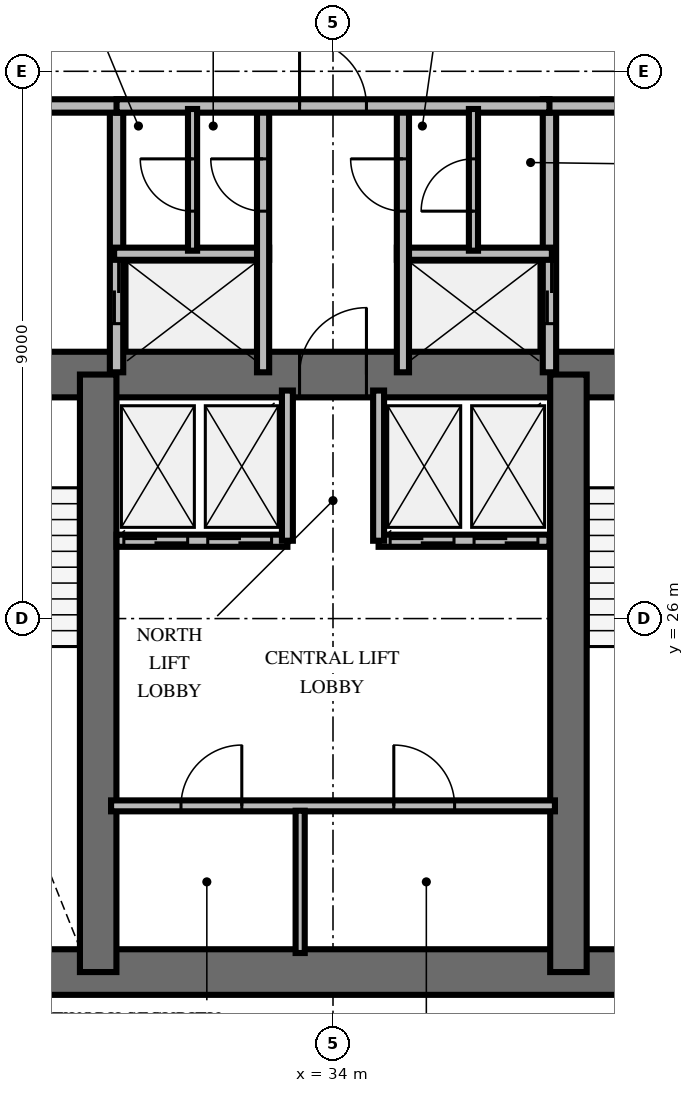
"""IFC4 building model, lengths in metres.
Left out: names, types, materials, properties, quantities, classifications, styles, units other than length and angle.
Written with IfcOpenShell. Run it as: python <this file> out.ifc"""

import sys

from ifc_helpers import new_model, si_unit, direction, frame, frame_2d, origin, place, context, subcontext, project, spatial, rectangle, extrude, element, fill, save


model = new_model("IFC4")
c1 = context("Model", 3, precision=1e-05, world=origin(), true_north=direction((0.0, 1.0)))
c2 = subcontext(c1, "Body", "Model", "MODEL_VIEW")
j1 = project(units=[si_unit("LENGTHUNIT", "METRE"), si_unit("PLANEANGLEUNIT", "RADIAN")], contexts=[c1])
p1 = place(None, origin())
s1 = spatial("IfcSite", under=j1, at=p1, CompositionType="ELEMENT")
p2 = place(p1, origin())
s2 = spatial("IfcBuilding", under=s1, at=p2, CompositionType="ELEMENT")
p3 = place(p2, frame((0.0, 0.0, 202.4)))
s3 = spatial("IfcBuildingStorey", under=s2, at=p3, CompositionType="ELEMENT", Elevation=202.4)
p4 = place(p3, frame((26.072, 20.187, 0.0), z_axis=(0.0, 0.0, 1.0), x_axis=(1.0, 0.0, 0.0)))
e1 = element("IfcWall", 1, at=p4, inside=s3, PredefinedType="SHEAR", context=c2, shape_type="SweptSolid", body=[
    extrude(rectangle(XDim=15.866, YDim=0.75, at=frame_2d((7.933, 0.0))), origin(), (0.0, 0.0, 1.0), 3.6),
])
p5 = place(p3, frame((26.072, 30.013, 0.0), z_axis=(0.0, 0.0, 1.0), x_axis=(1.0, 0.0, 0.0)))
e2 = element("IfcWall", 2, at=p5, inside=s3, PredefinedType="SHEAR", context=c2, shape_type="SweptSolid", body=[
    extrude(rectangle(XDim=15.866, YDim=0.75, at=frame_2d((7.933, 0.0))), origin(), (0.0, 0.0, 1.0), 3.6),
])
p6 = place(p5, frame((0.878, 0.0, 0.0)))
e3 = element("IfcOpeningElement", 3, at=p6, cuts=e2, PredefinedType="OPENING", context=c2, shape_type="SweptSolid", body=[
    extrude(rectangle(XDim=1.05, YDim=2.15, at=frame_2d((0.525, 1.075))), frame((0.0, 0.385, 0.0), z_axis=(0.0, -1.0, 0.0), x_axis=(1.0, 0.0, 0.0)), (0.0, 0.0, 1.0), 0.77),
])
p7 = place(p5, frame((13.928, 0.0, 0.0)))
e4 = element("IfcOpeningElement", 4, at=p7, cuts=e2, PredefinedType="OPENING", context=c2, shape_type="SweptSolid", body=[
    extrude(rectangle(XDim=1.05, YDim=2.15, at=frame_2d((0.525, 1.075))), frame((0.0, 0.385, 0.0), z_axis=(0.0, -1.0, 0.0), x_axis=(1.0, 0.0, 0.0)), (0.0, 0.0, 1.0), 0.77),
])
p8 = place(p5, frame((7.378, 0.0, 0.0)))
e5 = element("IfcOpeningElement", 5, at=p8, cuts=e2, PredefinedType="OPENING", context=c2, shape_type="SweptSolid", body=[
    extrude(rectangle(XDim=1.1, YDim=2.15, at=frame_2d((0.55, 1.075))), frame((0.0, 0.385, 0.0), z_axis=(0.0, -1.0, 0.0), x_axis=(1.0, 0.0, 0.0)), (0.0, 0.0, 1.0), 0.77),
])
for number, where, z_axis, x_axis in (
    (6, (30.138, 20.187, 0.0), (0.0, 0.0, 1.0), (0.0, 1.0, 0.0)),
    (7, (37.872, 20.187, 0.0), (0.0, 0.0, 1.0), (0.0, 1.0, 0.0)),
):
    element("IfcWall", number, at=place(p3, frame(where, z_axis=z_axis, x_axis=x_axis)), inside=s3, PredefinedType="SHEAR", context=c2, shape_type="SweptSolid", body=[
        extrude(rectangle(XDim=9.826, YDim=0.6, at=frame_2d((4.913, 0.0))), origin(), (0.0, 0.0, 1.0), 3.6),
    ])
p9 = place(p3, frame((30.44, 30.05, 0.0), z_axis=(0.0, 0.0, 1.0), x_axis=(0.0, 1.0, 0.0)))
e8 = element("IfcWall", 8, at=p9, inside=s3, PredefinedType="SOLIDWALL", context=c2, shape_type="SweptSolid", body=[
    extrude(rectangle(XDim=4.38, YDim=0.22, at=frame_2d((2.19, 0.0))), origin(), (0.0, 0.0, 1.0), 2.46),
])
p10 = place(p9, frame((0.8, 0.0, 0.0)))
e9 = element("IfcOpeningElement", 9, at=p10, cuts=e8, PredefinedType="OPENING", context=c2, shape_type="SweptSolid", body=[
    extrude(rectangle(XDim=1.05, YDim=2.1, at=frame_2d((0.525, 1.05))), frame((0.0, 0.12, 0.0), z_axis=(0.0, -1.0, 0.0), x_axis=(1.0, 0.0, 0.0)), (0.0, 0.0, 1.0), 0.24),
])
p11 = place(p3, frame((26.24, 34.43, 0.0), z_axis=(0.0, 0.0, 1.0), x_axis=(1.0, 0.0, 0.0)))
e10 = element("IfcWall", 10, at=p11, inside=s3, PredefinedType="SOLIDWALL", context=c2, shape_type="SweptSolid", body=[
    extrude(rectangle(XDim=4.31, YDim=0.22, at=frame_2d((2.155, 0.0))), origin(), (0.0, 0.0, 1.0), 2.46),
])
p12 = place(p11, frame((1.6, 0.0, 0.0)))
e11 = element("IfcOpeningElement", 11, at=p12, cuts=e10, PredefinedType="OPENING", context=c2, shape_type="SweptSolid", body=[
    extrude(rectangle(XDim=1.1, YDim=2.15, at=frame_2d((0.55, 1.075))), frame((0.0, 0.12, 0.0), z_axis=(0.0, -1.0, 0.0), x_axis=(1.0, 0.0, 0.0)), (0.0, 0.0, 1.0), 0.24),
])
p13 = place(p3, frame((30.4, 32.0, 0.0), z_axis=(0.0, 0.0, 1.0), x_axis=(1.0, 0.0, 0.0)))
e12 = element("IfcWall", 12, at=p13, inside=s3, PredefinedType="SOLIDWALL", context=c2, shape_type="SweptSolid", body=[
    extrude(rectangle(XDim=2.55, YDim=0.2, at=frame_2d((1.275, 0.0))), origin(), (0.0, 0.0, 1.0), 2.46),
])
p14 = place(p3, frame((32.85, 30.05, 0.0), z_axis=(0.0, 0.0, 1.0), x_axis=(0.0, 1.0, 0.0)))
e13 = element("IfcWall", 13, at=p14, inside=s3, PredefinedType="SOLIDWALL", context=c2, shape_type="SweptSolid", body=[
    extrude(rectangle(XDim=4.38, YDim=0.2, at=frame_2d((2.19, 0.0))), origin(), (0.0, 0.0, 1.0), 2.46),
])
p15 = place(p14, frame((2.65, 0.0, 0.0)))
e14 = element("IfcOpeningElement", 14, at=p15, cuts=e13, PredefinedType="OPENING", context=c2, shape_type="SweptSolid", body=[
    extrude(rectangle(XDim=0.86, YDim=2.05, at=frame_2d((0.43, 1.025))), frame((0.0, 0.11, 0.0), z_axis=(0.0, -1.0, 0.0), x_axis=(1.0, 0.0, 0.0)), (0.0, 0.0, 1.0), 0.22),
])
p16 = place(p3, frame((37.56, 30.05, 0.0), z_axis=(0.0, 0.0, 1.0), x_axis=(0.0, 1.0, 0.0)))
e15 = element("IfcWall", 15, at=p16, inside=s3, PredefinedType="SOLIDWALL", context=c2, shape_type="SweptSolid", body=[
    extrude(rectangle(XDim=4.38, YDim=0.22, at=frame_2d((2.19, 0.0))), origin(), (0.0, 0.0, 1.0), 2.46),
])
p17 = place(p16, frame((0.8, 0.0, 0.0)))
e16 = element("IfcOpeningElement", 16, at=p17, cuts=e15, PredefinedType="OPENING", context=c2, shape_type="SweptSolid", body=[
    extrude(rectangle(XDim=1.05, YDim=2.1, at=frame_2d((0.525, 1.05))), frame((0.0, 0.12, 0.0), z_axis=(0.0, -1.0, 0.0), x_axis=(1.0, 0.0, 0.0)), (0.0, 0.0, 1.0), 0.24),
])
p18 = place(p3, frame((37.45, 34.43, 0.0), z_axis=(0.0, 0.0, 1.0), x_axis=(1.0, 0.0, 0.0)))
e17 = element("IfcWall", 17, at=p18, inside=s3, PredefinedType="SOLIDWALL", context=c2, shape_type="SweptSolid", body=[
    extrude(rectangle(XDim=4.31, YDim=0.22, at=frame_2d((2.155, 0.0))), origin(), (0.0, 0.0, 1.0), 2.46),
])
p19 = place(p18, frame((1.6, 0.0, 0.0)))
e18 = element("IfcOpeningElement", 18, at=p19, cuts=e17, PredefinedType="OPENING", context=c2, shape_type="SweptSolid", body=[
    extrude(rectangle(XDim=1.1, YDim=2.15, at=frame_2d((0.55, 1.075))), frame((0.0, 0.12, 0.0), z_axis=(0.0, -1.0, 0.0), x_axis=(1.0, 0.0, 0.0)), (0.0, 0.0, 1.0), 0.24),
])
p20 = place(p3, frame((35.05, 32.0, 0.0), z_axis=(0.0, 0.0, 1.0), x_axis=(1.0, 0.0, 0.0)))
e19 = element("IfcWall", 19, at=p20, inside=s3, PredefinedType="SOLIDWALL", context=c2, shape_type="SweptSolid", body=[
    extrude(rectangle(XDim=2.55, YDim=0.2, at=frame_2d((1.275, 0.0))), origin(), (0.0, 0.0, 1.0), 2.46),
])
p21 = place(p3, frame((35.15, 30.05, 0.0), z_axis=(0.0, 0.0, 1.0), x_axis=(0.0, 1.0, 0.0)))
e20 = element("IfcWall", 20, at=p21, inside=s3, PredefinedType="SOLIDWALL", context=c2, shape_type="SweptSolid", body=[
    extrude(rectangle(XDim=4.38, YDim=0.2, at=frame_2d((2.19, 0.0))), origin(), (0.0, 0.0, 1.0), 2.46),
])
p22 = place(p21, frame((2.65, 0.0, 0.0)))
e21 = element("IfcOpeningElement", 21, at=p22, cuts=e20, PredefinedType="OPENING", context=c2, shape_type="SweptSolid", body=[
    extrude(rectangle(XDim=0.86, YDim=2.05, at=frame_2d((0.43, 1.025))), frame((0.0, 0.11, 0.0), z_axis=(0.0, -1.0, 0.0), x_axis=(1.0, 0.0, 0.0)), (0.0, 0.0, 1.0), 0.22),
])
p23 = place(p3, frame((30.44, 34.43, 0.0), z_axis=(0.0, 0.0, 1.0), x_axis=(1.0, 0.0, 0.0)))
e22 = element("IfcWall", 22, at=p23, inside=s3, PredefinedType="SOLIDWALL", context=c2, shape_type="SweptSolid", body=[
    extrude(rectangle(XDim=7.12, YDim=0.22, at=frame_2d((3.56, 0.0))), origin(), (0.0, 0.0, 1.0), 2.46),
])
p24 = place(p23, frame((3.01, 0.0, 0.0)))
e23 = element("IfcOpeningElement", 23, at=p24, cuts=e22, PredefinedType="OPENING", context=c2, shape_type="SweptSolid", body=[
    extrude(rectangle(XDim=1.1, YDim=2.15, at=frame_2d((0.55, 1.075))), frame((0.0, 0.12, 0.0), z_axis=(0.0, -1.0, 0.0), x_axis=(1.0, 0.0, 0.0)), (0.0, 0.0, 1.0), 0.24),
])
p25 = place(p3, frame((31.69, 32.05, 0.0), z_axis=(0.0, 0.0, 1.0), x_axis=(0.0, 1.0, 0.0)))
e24 = element("IfcWall", 24, at=p25, inside=s3, PredefinedType="PARTITIONING", context=c2, shape_type="SweptSolid", body=[
    extrude(rectangle(XDim=2.33, YDim=0.15, at=frame_2d((1.165, 0.0))), origin(), (0.0, 0.0, 1.0), 2.46),
])
p26 = place(p25, frame((0.65, 0.0, 0.0)))
e25 = element("IfcOpeningElement", 25, at=p26, cuts=e24, PredefinedType="OPENING", context=c2, shape_type="SweptSolid", body=[
    extrude(rectangle(XDim=0.86, YDim=2.05, at=frame_2d((0.43, 1.025))), frame((0.0, 0.085, 0.0), z_axis=(0.0, -1.0, 0.0), x_axis=(1.0, 0.0, 0.0)), (0.0, 0.0, 1.0), 0.17),
])
p27 = place(p3, frame((36.31, 32.05, 0.0), z_axis=(0.0, 0.0, 1.0), x_axis=(0.0, 1.0, 0.0)))
e26 = element("IfcWall", 26, at=p27, inside=s3, PredefinedType="PARTITIONING", context=c2, shape_type="SweptSolid", body=[
    extrude(rectangle(XDim=2.33, YDim=0.15, at=frame_2d((1.165, 0.0))), origin(), (0.0, 0.0, 1.0), 2.46),
])
p28 = place(p27, frame((0.65, 0.0, 0.0)))
e27 = element("IfcOpeningElement", 27, at=p28, cuts=e26, PredefinedType="OPENING", context=c2, shape_type="SweptSolid", body=[
    extrude(rectangle(XDim=0.86, YDim=2.05, at=frame_2d((0.43, 1.025))), frame((0.0, 0.085, 0.0), z_axis=(0.0, -1.0, 0.0), x_axis=(1.0, 0.0, 0.0)), (0.0, 0.0, 1.0), 0.17),
])
p29 = place(p3, frame((30.35, 22.92, 0.0), z_axis=(0.0, 0.0, 1.0), x_axis=(1.0, 0.0, 0.0)))
e28 = element("IfcWall", 28, at=p29, inside=s3, PredefinedType="PARTITIONING", context=c2, shape_type="SweptSolid", body=[
    extrude(rectangle(XDim=7.3, YDim=0.18, at=frame_2d((3.65, 0.0))), origin(), (0.0, 0.0, 1.0), 2.46),
])
p30 = place(p29, frame((1.15, 0.0, 0.0)))
e29 = element("IfcOpeningElement", 29, at=p30, cuts=e28, PredefinedType="OPENING", context=c2, shape_type="SweptSolid", body=[
    extrude(rectangle(XDim=1.0, YDim=2.15, at=frame_2d((0.5, 1.075))), frame((0.0, 0.1, 0.0), z_axis=(0.0, -1.0, 0.0), x_axis=(1.0, 0.0, 0.0)), (0.0, 0.0, 1.0), 0.2),
])
p31 = place(p29, frame((4.65, 0.0, 0.0)))
e30 = element("IfcOpeningElement", 30, at=p31, cuts=e28, PredefinedType="OPENING", context=c2, shape_type="SweptSolid", body=[
    extrude(rectangle(XDim=1.0, YDim=2.15, at=frame_2d((0.5, 1.075))), frame((0.0, 0.1, 0.0), z_axis=(0.0, -1.0, 0.0), x_axis=(1.0, 0.0, 0.0)), (0.0, 0.0, 1.0), 0.2),
])
p32 = place(p3, frame((33.46, 20.5, 0.0), z_axis=(0.0, 0.0, 1.0), x_axis=(0.0, 1.0, 0.0)))
e31 = element("IfcWall", 31, at=p32, inside=s3, PredefinedType="PARTITIONING", context=c2, shape_type="SweptSolid", body=[
    extrude(rectangle(XDim=2.34, YDim=0.15, at=frame_2d((1.17, 0.0))), origin(), (0.0, 0.0, 1.0), 2.46),
])
p33 = place(p3, frame((30.44, 27.28, 0.0), z_axis=(0.0, 0.0, 1.0), x_axis=(1.0, 0.0, 0.0)))
e32 = element("IfcWall", 32, at=p33, inside=s3, PredefinedType="SOLIDWALL", context=c2, shape_type="SweptSolid", body=[
    extrude(rectangle(XDim=2.81, YDim=0.2, at=frame_2d((1.405, 0.0))), origin(), (0.0, 0.0, 1.0), 2.46),
])
p34 = place(p33, frame((0.12, 0.0, 0.0)))
e33 = element("IfcOpeningElement", 33, at=p34, cuts=e32, PredefinedType="OPENING", context=c2, shape_type="SweptSolid", body=[
    extrude(rectangle(XDim=1.05, YDim=2.1, at=frame_2d((0.525, 1.05))), frame((0.0, 0.11, 0.0), z_axis=(0.0, -1.0, 0.0), x_axis=(1.0, 0.0, 0.0)), (0.0, 0.0, 1.0), 0.22),
])
p35 = place(p33, frame((1.5, 0.0, 0.0)))
e34 = element("IfcOpeningElement", 34, at=p35, cuts=e32, PredefinedType="OPENING", context=c2, shape_type="SweptSolid", body=[
    extrude(rectangle(XDim=1.05, YDim=2.1, at=frame_2d((0.525, 1.05))), frame((0.0, 0.11, 0.0), z_axis=(0.0, -1.0, 0.0), x_axis=(1.0, 0.0, 0.0)), (0.0, 0.0, 1.0), 0.22),
])
p36 = place(p3, frame((33.25, 27.28, 0.0), z_axis=(0.0, 0.0, 1.0), x_axis=(0.0, 1.0, 0.0)))
e35 = element("IfcWall", 35, at=p36, inside=s3, PredefinedType="SOLIDWALL", context=c2, shape_type="SweptSolid", body=[
    extrude(rectangle(XDim=2.47, YDim=0.18, at=frame_2d((1.235, 0.0))), origin(), (0.0, 0.0, 1.0), 2.46),
])
p37 = place(p3, frame((34.75, 27.28, 0.0), z_axis=(0.0, 0.0, 1.0), x_axis=(1.0, 0.0, 0.0)))
e36 = element("IfcWall", 36, at=p37, inside=s3, PredefinedType="SOLIDWALL", context=c2, shape_type="SweptSolid", body=[
    extrude(rectangle(XDim=2.81, YDim=0.2, at=frame_2d((1.405, 0.0))), origin(), (0.0, 0.0, 1.0), 2.46),
])
p38 = place(p37, frame((0.19, 0.0, 0.0)))
e37 = element("IfcOpeningElement", 37, at=p38, cuts=e36, PredefinedType="OPENING", context=c2, shape_type="SweptSolid", body=[
    extrude(rectangle(XDim=1.05, YDim=2.1, at=frame_2d((0.525, 1.05))), frame((0.0, 0.11, 0.0), z_axis=(0.0, -1.0, 0.0), x_axis=(1.0, 0.0, 0.0)), (0.0, 0.0, 1.0), 0.22),
])
p39 = place(p37, frame((1.57, 0.0, 0.0)))
e38 = element("IfcOpeningElement", 38, at=p39, cuts=e36, PredefinedType="OPENING", context=c2, shape_type="SweptSolid", body=[
    extrude(rectangle(XDim=1.05, YDim=2.1, at=frame_2d((0.525, 1.05))), frame((0.0, 0.11, 0.0), z_axis=(0.0, -1.0, 0.0), x_axis=(1.0, 0.0, 0.0)), (0.0, 0.0, 1.0), 0.22),
])
p40 = place(p3, frame((34.75, 27.28, 0.0), z_axis=(0.0, 0.0, 1.0), x_axis=(0.0, 1.0, 0.0)))
e39 = element("IfcWall", 39, at=p40, inside=s3, PredefinedType="SOLIDWALL", context=c2, shape_type="SweptSolid", body=[
    extrude(rectangle(XDim=2.47, YDim=0.18, at=frame_2d((1.235, 0.0))), origin(), (0.0, 0.0, 1.0), 2.46),
])
p41 = place(p3, frame((27.5, 35.28, 0.0), z_axis=(0.0, 0.0, 1.0), x_axis=(0.953691418528, 0.300786765376, 0.0)))
e40 = element("IfcWall", 40, at=p41, inside=s3, PredefinedType="PARTITIONING", context=c2, shape_type="SweptSolid", body=[
    extrude(rectangle(XDim=6.816, YDim=0.18, at=frame_2d((3.408, 0.0))), origin(), (0.0, 0.0, 1.0), 2.46),
])
p42 = place(p41, frame((2.858, 0.0, 0.0)))
e41 = element("IfcOpeningElement", 41, at=p42, cuts=e40, PredefinedType="OPENING", context=c2, shape_type="SweptSolid", body=[
    extrude(rectangle(XDim=1.1, YDim=2.15, at=frame_2d((0.55, 1.075))), frame((0.0, 0.1, 0.0), z_axis=(0.0, -1.0, 0.0), x_axis=(1.0, 0.0, 0.0)), (0.0, 0.0, 1.0), 0.2),
])
p43 = place(p3, frame((34.0, 37.33, 0.0), z_axis=(0.0, 0.0, 1.0), x_axis=(0.953691418528, -0.300786765376, 0.0)))
e42 = element("IfcWall", 42, at=p43, inside=s3, PredefinedType="PARTITIONING", context=c2, shape_type="SweptSolid", body=[
    extrude(rectangle(XDim=6.816, YDim=0.18, at=frame_2d((3.408, 0.0))), origin(), (0.0, 0.0, 1.0), 2.46),
])
p44 = place(p43, frame((2.858, 0.0, 0.0)))
e43 = element("IfcOpeningElement", 43, at=p44, cuts=e42, PredefinedType="OPENING", context=c2, shape_type="SweptSolid", body=[
    extrude(rectangle(XDim=1.1, YDim=2.15, at=frame_2d((0.55, 1.075))), frame((0.0, 0.1, 0.0), z_axis=(0.0, -1.0, 0.0), x_axis=(1.0, 0.0, 0.0)), (0.0, 0.0, 1.0), 0.2),
])
p45 = place(p8, origin())
e44 = element("IfcDoor", 44, at=p45, inside=s3, OperationType="SINGLE_SWING_RIGHT", PredefinedType="DOOR", context=c2, shape_type="SweptSolid", body=[
    extrude(rectangle(XDim=1.1, YDim=2.15, at=frame_2d((0.55, 1.075))), frame((0.0, 0.025, 0.0), z_axis=(0.0, -1.0, 0.0), x_axis=(1.0, 0.0, 0.0)), (0.0, 0.0, 1.0), 0.05),
])
fill(e5, e44)
p46 = place(p10, origin())
e45 = element("IfcDoor", 45, at=p46, inside=s3, OperationType="DOUBLE_DOOR_SLIDING", PredefinedType="USERDEFINED", context=c2, shape_type="SweptSolid", body=[
    extrude(rectangle(XDim=1.05, YDim=2.1, at=frame_2d((0.525, 1.05))), frame((0.0, 0.025, 0.0), z_axis=(0.0, -1.0, 0.0), x_axis=(1.0, 0.0, 0.0)), (0.0, 0.0, 1.0), 0.05),
])
fill(e9, e45)
p47 = place(p15, origin())
e46 = element("IfcDoor", 46, at=p47, inside=s3, OperationType="SINGLE_SWING_RIGHT", PredefinedType="TRAPDOOR", context=c2, shape_type="SweptSolid", body=[
    extrude(rectangle(XDim=0.86, YDim=2.05, at=frame_2d((0.43, 1.025))), frame((0.0, 0.025, 0.0), z_axis=(0.0, -1.0, 0.0), x_axis=(1.0, 0.0, 0.0)), (0.0, 0.0, 1.0), 0.05),
])
fill(e14, e46)
p48 = place(p17, origin())
e47 = element("IfcDoor", 47, at=p48, inside=s3, OperationType="DOUBLE_DOOR_SLIDING", PredefinedType="USERDEFINED", context=c2, shape_type="SweptSolid", body=[
    extrude(rectangle(XDim=1.05, YDim=2.1, at=frame_2d((0.525, 1.05))), frame((0.0, 0.025, 0.0), z_axis=(0.0, -1.0, 0.0), x_axis=(1.0, 0.0, 0.0)), (0.0, 0.0, 1.0), 0.05),
])
fill(e16, e47)
p49 = place(p22, origin())
e48 = element("IfcDoor", 48, at=p49, inside=s3, OperationType="SINGLE_SWING_RIGHT", PredefinedType="TRAPDOOR", context=c2, shape_type="SweptSolid", body=[
    extrude(rectangle(XDim=0.86, YDim=2.05, at=frame_2d((0.43, 1.025))), frame((0.0, 0.025, 0.0), z_axis=(0.0, -1.0, 0.0), x_axis=(1.0, 0.0, 0.0)), (0.0, 0.0, 1.0), 0.05),
])
fill(e21, e48)
p50 = place(p24, origin())
e49 = element("IfcDoor", 49, at=p50, inside=s3, OperationType="SINGLE_SWING_LEFT", PredefinedType="DOOR", context=c2, shape_type="SweptSolid", body=[
    extrude(rectangle(XDim=1.1, YDim=2.15, at=frame_2d((0.55, 1.075))), frame((0.0, 0.025, 0.0), z_axis=(0.0, -1.0, 0.0), x_axis=(1.0, 0.0, 0.0)), (0.0, 0.0, 1.0), 0.05),
])
fill(e23, e49)
p51 = place(p26, origin())
e50 = element("IfcDoor", 50, at=p51, inside=s3, OperationType="SINGLE_SWING_RIGHT", PredefinedType="TRAPDOOR", context=c2, shape_type="SweptSolid", body=[
    extrude(rectangle(XDim=0.86, YDim=2.05, at=frame_2d((0.43, 1.025))), frame((0.0, 0.025, 0.0), z_axis=(0.0, -1.0, 0.0), x_axis=(1.0, 0.0, 0.0)), (0.0, 0.0, 1.0), 0.05),
])
fill(e25, e50)
p52 = place(p28, origin())
e51 = element("IfcDoor", 51, at=p52, inside=s3, OperationType="SINGLE_SWING_LEFT", PredefinedType="TRAPDOOR", context=c2, shape_type="SweptSolid", body=[
    extrude(rectangle(XDim=0.86, YDim=2.05, at=frame_2d((0.43, 1.025))), frame((0.0, 0.025, 0.0), z_axis=(0.0, -1.0, 0.0), x_axis=(1.0, 0.0, 0.0)), (0.0, 0.0, 1.0), 0.05),
])
fill(e27, e51)
p53 = place(p30, origin())
e52 = element("IfcDoor", 52, at=p53, inside=s3, OperationType="SINGLE_SWING_RIGHT", PredefinedType="DOOR", context=c2, shape_type="SweptSolid", body=[
    extrude(rectangle(XDim=1.0, YDim=2.15, at=frame_2d((0.5, 1.075))), frame((0.0, 0.025, 0.0), z_axis=(0.0, -1.0, 0.0), x_axis=(1.0, 0.0, 0.0)), (0.0, 0.0, 1.0), 0.05),
])
fill(e29, e52)
p54 = place(p31, origin())
e53 = element("IfcDoor", 53, at=p54, inside=s3, OperationType="SINGLE_SWING_LEFT", PredefinedType="DOOR", context=c2, shape_type="SweptSolid", body=[
    extrude(rectangle(XDim=1.0, YDim=2.15, at=frame_2d((0.5, 1.075))), frame((0.0, 0.025, 0.0), z_axis=(0.0, -1.0, 0.0), x_axis=(1.0, 0.0, 0.0)), (0.0, 0.0, 1.0), 0.05),
])
fill(e30, e53)
p55 = place(p34, origin())
e54 = element("IfcDoor", 54, at=p55, inside=s3, OperationType="DOUBLE_DOOR_SLIDING", PredefinedType="USERDEFINED", context=c2, shape_type="SweptSolid", body=[
    extrude(rectangle(XDim=1.05, YDim=2.1, at=frame_2d((0.525, 1.05))), frame((0.0, 0.025, 0.0), z_axis=(0.0, -1.0, 0.0), x_axis=(1.0, 0.0, 0.0)), (0.0, 0.0, 1.0), 0.05),
])
fill(e33, e54)
p56 = place(p35, origin())
e55 = element("IfcDoor", 55, at=p56, inside=s3, OperationType="DOUBLE_DOOR_SLIDING", PredefinedType="USERDEFINED", context=c2, shape_type="SweptSolid", body=[
    extrude(rectangle(XDim=1.05, YDim=2.1, at=frame_2d((0.525, 1.05))), frame((0.0, 0.025, 0.0), z_axis=(0.0, -1.0, 0.0), x_axis=(1.0, 0.0, 0.0)), (0.0, 0.0, 1.0), 0.05),
])
fill(e34, e55)
p57 = place(p38, origin())
e56 = element("IfcDoor", 56, at=p57, inside=s3, OperationType="DOUBLE_DOOR_SLIDING", PredefinedType="USERDEFINED", context=c2, shape_type="SweptSolid", body=[
    extrude(rectangle(XDim=1.05, YDim=2.1, at=frame_2d((0.525, 1.05))), frame((0.0, 0.025, 0.0), z_axis=(0.0, -1.0, 0.0), x_axis=(1.0, 0.0, 0.0)), (0.0, 0.0, 1.0), 0.05),
])
fill(e37, e56)
p58 = place(p39, origin())
e57 = element("IfcDoor", 57, at=p58, inside=s3, OperationType="DOUBLE_DOOR_SLIDING", PredefinedType="USERDEFINED", context=c2, shape_type="SweptSolid", body=[
    extrude(rectangle(XDim=1.05, YDim=2.1, at=frame_2d((0.525, 1.05))), frame((0.0, 0.025, 0.0), z_axis=(0.0, -1.0, 0.0), x_axis=(1.0, 0.0, 0.0)), (0.0, 0.0, 1.0), 0.05),
])
fill(e38, e57)
save(model, sys.argv[1])
